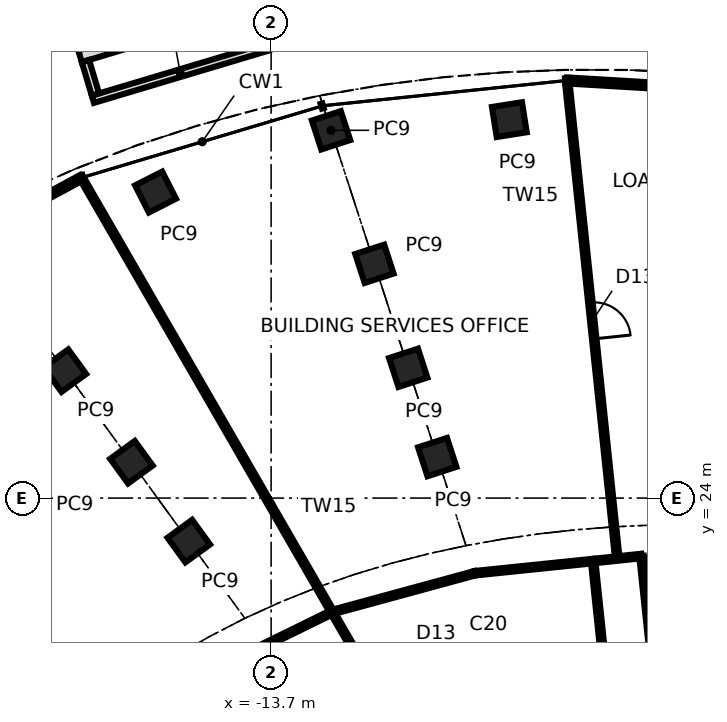
"""IFC4 building model, lengths in metres.
Left out: names, types, materials, properties, quantities, classifications, styles, units other than length and angle.
Written with IfcOpenShell. Run it as: python <this file> out.ifc"""

import sys

from ifc_helpers import new_model, si_unit, direction, frame, frame_2d, origin, origin_2d, place, context, subcontext, project, spatial, rectangle, extrude, element, fill, save


model = new_model("IFC4")
c1 = context("Model", 3, precision=1e-05, world=origin(), true_north=direction((0.0, 1.0)))
c2 = subcontext(c1, "Body", "Model", "MODEL_VIEW")
j1 = project(units=[si_unit("LENGTHUNIT", "METRE"), si_unit("PLANEANGLEUNIT", "RADIAN")], contexts=[c1])
p1 = place(None, origin())
s1 = spatial("IfcSite", under=j1, at=p1, CompositionType="ELEMENT")
p2 = place(p1, origin())
s2 = spatial("IfcBuilding", under=s1, at=p2, CompositionType="ELEMENT")
p3 = place(p2, origin())
s3 = spatial("IfcBuildingStorey", under=s2, at=p3, CompositionType="ELEMENT", Elevation=0.0)
for number, where, z_axis, x_axis in (
    (1, (-5.864, 36.449, 0.0), (0.0, 0.0, 1.0), (-0.156, 0.988, 0.0)),
    (2, (-11.729, 36.097, 0.0), (0.0, 0.0, 1.0), (-0.309, 0.951, 0.0)),
    (3, (-17.502, 34.066, 0.0), (0.0, 0.0, 1.0), (-0.454, 0.891, 0.0)),
    (4, (-10.302, 31.706, 0.0), (0.0, 0.0, 1.0), (-0.309, 0.951, 0.0)),
    (5, (-20.483, 28.192, 0.0), (0.0, 0.0, 1.0), (-0.588, 0.809, 0.0)),
    (6, (-9.19, 28.285, 0.0), (0.0, 0.0, 1.0), (-0.309, 0.951, 0.0)),
    (7, (-18.294, 25.18, 0.0), (0.0, 0.0, 1.0), (-0.588, 0.809, 0.0)),
    (8, (-8.236, 25.347, 0.0), (0.0, 0.0, 1.0), (-0.309, 0.951, 0.0)),
    (9, (-16.409, 22.584, 0.0), (0.0, 0.0, 1.0), (-0.588, 0.809, 0.0)),
):
    element("IfcColumn", number, at=place(p3, frame(where, z_axis=z_axis, x_axis=x_axis)), inside=s3, PredefinedType="COLUMN", context=c2, shape_type="SweptSolid", body=[
        extrude(rectangle(XDim=1.0, YDim=1.0, at=origin_2d()), origin(), (0.0, 0.0, 1.0), 5.6),
    ])
p4 = place(p3, frame((3.917, 37.269, 0.0), z_axis=(0.0, 0.0, 1.0), x_axis=(-0.998244288685, 0.059231242672, 0.0)))
e10 = element("IfcWall", 10, at=p4, inside=s3, PredefinedType="SOLIDWALL", context=c2, shape_type="SweptSolid", body=[
    extrude(rectangle(XDim=7.897, YDim=0.2, at=frame_2d((3.949, 0.0))), origin(), (0.0, 0.0, 1.0), 5.4),
])
p5 = place(p4, frame((2.972, 0.0, 0.0)))
e11 = element("IfcOpeningElement", 11, at=p5, cuts=e10, PredefinedType="OPENING", context=c2, shape_type="SweptSolid", body=[
    extrude(rectangle(XDim=3.6, YDim=4.0, at=frame_2d((1.8, 2.0))), frame((0.0, 0.11, 0.0), z_axis=(0.0, -1.0, 0.0), x_axis=(1.0, 0.0, 0.0)), (0.0, 0.0, 1.0), 0.22),
])
p6 = place(p3, frame((-19.94, 34.537, 0.0), z_axis=(0.0, 0.0, 1.0), x_axis=(-0.879579965321, -0.475751074204, 0.0)))
e12 = element("IfcWall", 12, at=p6, inside=s3, PredefinedType="SOLIDWALL", context=c2, shape_type="SweptSolid", body=[
    extrude(rectangle(XDim=8.531, YDim=0.2, at=frame_2d((4.265, 0.0))), origin(), (0.0, 0.0, 1.0), 5.4),
])
p7 = place(p6, frame((6.33, 0.0, 0.0)))
e13 = element("IfcOpeningElement", 13, at=p7, cuts=e12, PredefinedType="OPENING", context=c2, shape_type="SweptSolid", body=[
    extrude(rectangle(XDim=1.8, YDim=2.7, at=frame_2d((0.9, 1.35))), frame((0.0, 0.11, 0.0), z_axis=(0.0, -1.0, 0.0), x_axis=(1.0, 0.0, 0.0)), (0.0, 0.0, 1.0), 0.22),
])
p8 = place(p6, frame((4.93, 0.0, 0.3)))
e14 = element("IfcOpeningElement", 14, at=p8, cuts=e12, PredefinedType="OPENING", context=c2, shape_type="SweptSolid", body=[
    extrude(rectangle(XDim=1.2, YDim=2.4, at=frame_2d((0.6, 1.2))), frame((0.0, 0.11, 0.0), z_axis=(0.0, -1.0, 0.0), x_axis=(1.0, 0.0, 0.0)), (0.0, 0.0, 1.0), 0.22),
])
p9 = place(p6, frame((6.33, 0.0, 3.0)))
e15 = element("IfcOpeningElement", 15, at=p9, cuts=e12, PredefinedType="OPENING", context=c2, shape_type="SweptSolid", body=[
    extrude(rectangle(XDim=1.8, YDim=0.9, at=frame_2d((0.9, 0.45))), frame((0.0, 0.11, 0.0), z_axis=(0.0, -1.0, 0.0), x_axis=(1.0, 0.0, 0.0)), (0.0, 0.0, 1.0), 0.22),
])
p10 = place(p3, frame((-13.814, 38.839, -0.15), z_axis=(0.0, 0.0, 1.0), x_axis=(-0.958018696907, -0.286705731329, 0.0)))
e16 = element("IfcWall", 16, at=p10, inside=s3, PredefinedType="SOLIDWALL", context=c2, shape_type="SweptSolid", body=[
    extrude(rectangle(XDim=6.0, YDim=0.25, at=frame_2d((3.0, 0.0))), origin(), (0.0, 0.0, 1.0), 0.6),
])
p11 = place(p3, frame((-14.237, 40.252, -0.15), z_axis=(0.0, 0.0, 1.0), x_axis=(-0.958018696907, -0.286705731329, 0.0)))
e17 = element("IfcWall", 17, at=p11, inside=s3, PredefinedType="SOLIDWALL", context=c2, shape_type="SweptSolid", body=[
    extrude(rectangle(XDim=6.0, YDim=0.4, at=frame_2d((3.0, 0.0))), origin(), (0.0, 0.0, 1.0), 0.6),
])
p12 = place(p3, frame((-19.478, 37.275, -0.15), z_axis=(0.0, 0.0, 1.0), x_axis=(-0.286783068166, 0.957995548953, 0.0)))
e18 = element("IfcWall", 18, at=p12, inside=s3, PredefinedType="SOLIDWALL", context=c2, shape_type="SweptSolid", body=[
    extrude(rectangle(XDim=1.15, YDim=0.25, at=frame_2d((0.575, 0.0))), origin(), (0.0, 0.0, 1.0), 0.6),
])
p13 = place(p3, frame((2.296, 21.845, 0.0), z_axis=(0.0, 0.0, 1.0), x_axis=(-0.999349376357, 0.036066937421, 0.0)))
e19 = element("IfcWall", 19, at=p13, inside=s3, PredefinedType="PARTITIONING", context=c2, shape_type="SweptSolid", body=[
    extrude(rectangle(XDim=3.804, YDim=0.15, at=frame_2d((1.902, 0.0))), origin(), (0.0, 0.0, 1.0), 5.4),
])
p14 = place(p3, frame((-0.383, 11.3, 0.0), z_axis=(0.0, 0.0, 1.0), x_axis=(-0.104514398363, 0.994523373549, 0.0)))
e20 = element("IfcWall", 20, at=p14, inside=s3, PredefinedType="PARTITIONING", context=c2, shape_type="SweptSolid", body=[
    extrude(rectangle(XDim=10.741, YDim=0.15, at=frame_2d((5.37, 0.0))), origin(), (0.0, 0.0, 1.0), 5.4),
])
p15 = place(p14, frame((4.552, 0.0, 0.0)))
e21 = element("IfcOpeningElement", 21, at=p15, cuts=e20, PredefinedType="OPENING", context=c2, shape_type="SweptSolid", body=[
    extrude(rectangle(XDim=1.2, YDim=2.4, at=frame_2d((0.6, 1.2))), frame((0.0, 0.085, 0.0), z_axis=(0.0, -1.0, 0.0), x_axis=(1.0, 0.0, 0.0)), (0.0, 0.0, 1.0), 0.17),
])
p16 = place(p3, frame((-1.506, 21.982, 0.0), z_axis=(0.0, 0.0, 1.0), x_axis=(-0.105469062013, 0.994422584698, 0.0)))
e22 = element("IfcWall", 22, at=p16, inside=s3, PredefinedType="PARTITIONING", context=c2, shape_type="SweptSolid", body=[
    extrude(rectangle(XDim=0.114, YDim=0.15, at=frame_2d((0.057, 0.0))), origin(), (0.0, 0.0, 1.0), 5.4),
])
p17 = place(p3, frame((-1.518, 22.095, 0.0), z_axis=(0.0, 0.0, 1.0), x_axis=(-0.994522996201, -0.104517989015, 0.0)))
e23 = element("IfcWall", 23, at=p17, inside=s3, PredefinedType="PARTITIONING", context=c2, shape_type="SweptSolid", body=[
    extrude(rectangle(XDim=1.6, YDim=0.15, at=frame_2d((0.8, 0.0))), origin(), (0.0, 0.0, 1.0), 5.4),
])
p18 = place(p3, frame((-2.313, 22.011, 0.0), z_axis=(0.0, 0.0, 1.0), x_axis=(-0.104529687623, 0.994521766683, 0.0)))
e24 = element("IfcWall", 24, at=p18, inside=s3, PredefinedType="PARTITIONING", context=c2, shape_type="SweptSolid", body=[
    extrude(rectangle(XDim=15.733, YDim=0.15, at=frame_2d((7.866, 0.0))), origin(), (0.0, 0.0, 1.0), 5.4),
])
p19 = place(p18, frame((7.266, 0.0, 0.0)))
e25 = element("IfcOpeningElement", 25, at=p19, cuts=e24, PredefinedType="OPENING", context=c2, shape_type="SweptSolid", body=[
    extrude(rectangle(XDim=1.2, YDim=2.4, at=frame_2d((0.6, 1.2))), frame((0.0, 0.085, 0.0), z_axis=(0.0, -1.0, 0.0), x_axis=(1.0, 0.0, 0.0)), (0.0, 0.0, 1.0), 0.17),
])
p20 = place(p3, frame((-3.109, 21.927, 0.0), z_axis=(0.0, 0.0, 1.0), x_axis=(0.104524229431, -0.994522340353, 0.0)))
e26 = element("IfcWall", 26, at=p20, inside=s3, PredefinedType="PARTITIONING", context=c2, shape_type="SweptSolid", body=[
    extrude(rectangle(XDim=10.686, YDim=0.15, at=frame_2d((5.343, 0.0))), origin(), (0.0, 0.0, 1.0), 5.4),
])
p21 = place(p20, frame((3.864, 0.0, 0.0)))
e27 = element("IfcOpeningElement", 27, at=p21, cuts=e26, PredefinedType="OPENING", context=c2, shape_type="SweptSolid", body=[
    extrude(rectangle(XDim=1.2, YDim=2.4, at=frame_2d((0.6, 1.2))), frame((0.0, 0.085, 0.0), z_axis=(0.0, -1.0, 0.0), x_axis=(1.0, 0.0, 0.0)), (0.0, 0.0, 1.0), 0.17),
])
p22 = place(p3, frame((-3.109, 21.929, 0.0), z_axis=(0.0, 0.0, 1.0), x_axis=(-0.994719772575, -0.102628329662, 0.0)))
e28 = element("IfcWall", 28, at=p22, inside=s3, PredefinedType="PARTITIONING", context=c2, shape_type="SweptSolid", body=[
    extrude(rectangle(XDim=3.906, YDim=0.15, at=frame_2d((1.953, 0.0))), origin(), (0.0, 0.0, 1.0), 5.4),
])
p23 = place(p3, frame((-6.995, 21.528, 0.0), z_axis=(0.0, 0.0, 1.0), x_axis=(-0.964877176163, -0.26270141781, 0.0)))
e29 = element("IfcWall", 29, at=p23, inside=s3, PredefinedType="PARTITIONING", context=c2, shape_type="SweptSolid", body=[
    extrude(rectangle(XDim=4.867, YDim=0.15, at=frame_2d((2.434, 0.0))), origin(), (0.0, 0.0, 1.0), 5.4),
])
p24 = place(p3, frame((-6.524, 11.3, 0.0), z_axis=(0.0, 0.0, 1.0), x_axis=(-0.499999476762, 0.866025705876, 0.0)))
e30 = element("IfcWall", 30, at=p24, inside=s3, PredefinedType="PARTITIONING", context=c2, shape_type="SweptSolid", body=[
    extrude(rectangle(XDim=26.751, YDim=0.15, at=frame_2d((13.376, 0.0))), origin(), (0.0, 0.0, 1.0), 5.4),
])
p25 = place(p3, frame((-11.691, 20.25, 0.0), z_axis=(0.0, 0.0, 1.0), x_axis=(-0.897697488604, -0.440612322744, 0.0)))
e31 = element("IfcWall", 31, at=p25, inside=s3, PredefinedType="PARTITIONING", context=c2, shape_type="SweptSolid", body=[
    extrude(rectangle(XDim=5.054, YDim=0.15, at=frame_2d((2.527, 0.0))), origin(), (0.0, 0.0, 1.0), 5.4),
])
p26 = place(p5, origin())
e32 = element("IfcDoor", 32, at=p26, inside=s3, OperationType="ROLLINGUP", PredefinedType="DOOR", context=c2, shape_type="SweptSolid", body=[
    extrude(rectangle(XDim=3.6, YDim=4.0, at=frame_2d((1.8, 2.0))), frame((0.0, 0.025, 0.0), z_axis=(0.0, -1.0, 0.0), x_axis=(1.0, 0.0, 0.0)), (0.0, 0.0, 1.0), 0.05),
])
fill(e11, e32)
p27 = place(p19, frame((1.2, 0.0, 0.0), z_axis=(0.0, 0.0, 1.0), x_axis=(-1.0, 0.0, 0.0)))
e33 = element("IfcDoor", 33, at=p27, inside=s3, OperationType="SINGLE_SWING_RIGHT", PredefinedType="DOOR", context=c2, shape_type="SweptSolid", body=[
    extrude(rectangle(XDim=1.2, YDim=2.4, at=frame_2d((0.6, 1.2))), frame((0.0, 0.025, 0.0), z_axis=(0.0, -1.0, 0.0), x_axis=(1.0, 0.0, 0.0)), (0.0, 0.0, 1.0), 0.05),
])
fill(e25, e33)
save(model, sys.argv[1])
